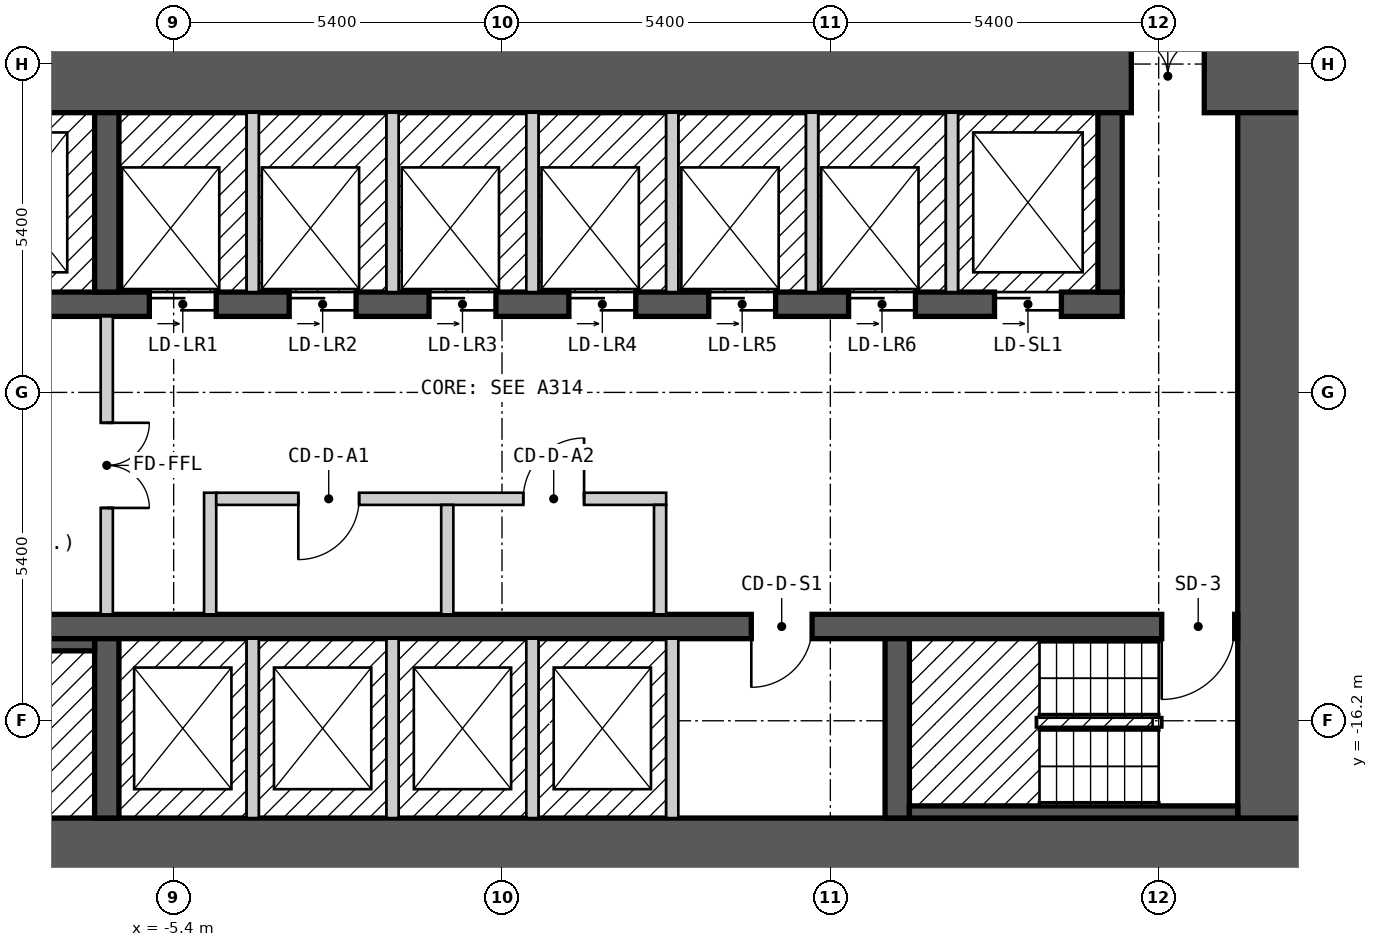
"""IFC4 building model, lengths in metres.
Left out: names, types, materials, properties, quantities, classifications, styles, units other than length and angle.
Written with IfcOpenShell. Run it as: python <this file> out.ifc"""

import sys

from ifc_helpers import new_model, si_unit, direction, frame, frame_2d, origin, place, context, subcontext, project, spatial, rectangle, extrude, element, fill, save


model = new_model("IFC4")
c1 = context("Model", 3, precision=1e-05, world=origin(), true_north=direction((0.0, 1.0)))
c2 = subcontext(c1, "Body", "Model", "MODEL_VIEW")
j1 = project(units=[si_unit("LENGTHUNIT", "METRE"), si_unit("PLANEANGLEUNIT", "RADIAN")], contexts=[c1])
p1 = place(None, origin())
s1 = spatial("IfcSite", under=j1, at=p1, CompositionType="ELEMENT")
p2 = place(p1, origin())
s2 = spatial("IfcBuilding", under=s1, at=p2, CompositionType="ELEMENT")
p3 = place(p2, frame((0.0, 0.0, 41.4)))
s3 = spatial("IfcBuildingStorey", under=s2, at=p3, CompositionType="ELEMENT", Elevation=41.4)
p4 = place(p3, frame((-13.3, -18.4, 0.0), z_axis=(0.0, 0.0, 1.0), x_axis=(1.0, 0.0, 0.0)))
e1 = element("IfcWall", 1, at=p4, inside=s3, PredefinedType="SHEAR", context=c2, shape_type="SweptSolid", body=[
    extrude(rectangle(XDim=26.6, YDim=1.2, at=frame_2d((13.3, 0.0))), origin(), (0.0, 0.0, 1.0), 2.7),
])
p5 = place(p3, frame((-13.3, -5.6, 0.0), z_axis=(0.0, 0.0, 1.0), x_axis=(1.0, 0.0, 0.0)))
e2 = element("IfcWall", 2, at=p5, inside=s3, PredefinedType="SHEAR", context=c2, shape_type="SweptSolid", body=[
    extrude(rectangle(XDim=26.6, YDim=1.2, at=frame_2d((13.3, 0.0))), origin(), (0.0, 0.0, 1.0), 2.7),
])
p6 = place(p5, frame((23.65, 0.0, 0.0)))
e3 = element("IfcOpeningElement", 3, at=p6, cuts=e2, PredefinedType="OPENING", context=c2, shape_type="SweptSolid", body=[
    extrude(rectangle(XDim=1.2, YDim=2.1, at=frame_2d((0.6, 1.05))), frame((0.0, 0.61, 0.0), z_axis=(0.0, -1.0, 0.0), x_axis=(1.0, 0.0, 0.0)), (0.0, 0.0, 1.0), 1.22),
])
p7 = place(p3, frame((12.7, -17.8, 0.0), z_axis=(0.0, 0.0, 1.0), x_axis=(0.0, 1.0, 0.0)))
e4 = element("IfcWall", 4, at=p7, inside=s3, PredefinedType="SHEAR", context=c2, shape_type="SweptSolid", body=[
    extrude(rectangle(XDim=11.6, YDim=1.2, at=frame_2d((5.8, 0.0))), origin(), (0.0, 0.0, 1.0), 2.7),
])
p8 = place(p3, frame((-12.1, -14.65, 0.0), z_axis=(0.0, 0.0, 1.0), x_axis=(1.0, 0.0, 0.0)))
e5 = element("IfcWall", 5, at=p8, inside=s3, PredefinedType="SHEAR", context=c2, shape_type="SweptSolid", body=[
    extrude(rectangle(XDim=24.2, YDim=0.4, at=frame_2d((12.1, 0.0))), origin(), (0.0, 0.0, 1.0), 2.7),
])
p9 = place(p8, frame((1.3, 0.0, 0.0), z_axis=(0.0, 0.0, 1.0), x_axis=(-1.0, 0.0, 0.0)))
e6 = element("IfcOpeningElement", 6, at=p9, cuts=e5, PredefinedType="OPENING", context=c2, shape_type="SweptSolid", body=[
    extrude(rectangle(XDim=1.2, YDim=2.1, at=frame_2d((0.6, 1.05))), frame((0.0, 0.21, 0.0), z_axis=(0.0, -1.0, 0.0), x_axis=(1.0, 0.0, 0.0)), (0.0, 0.0, 1.0), 0.42),
])
p10 = place(p8, frame((24.15, 0.0, 0.0), z_axis=(0.0, 0.0, 1.0), x_axis=(-1.0, 0.0, 0.0)))
e7 = element("IfcOpeningElement", 7, at=p10, cuts=e5, PredefinedType="OPENING", context=c2, shape_type="SweptSolid", body=[
    extrude(rectangle(XDim=1.2, YDim=2.1, at=frame_2d((0.6, 1.05))), frame((0.0, 0.21, 0.0), z_axis=(0.0, -1.0, 0.0), x_axis=(1.0, 0.0, 0.0)), (0.0, 0.0, 1.0), 0.42),
])
p11 = place(p8, frame((17.2, 0.0, 0.0), z_axis=(0.0, 0.0, 1.0), x_axis=(-1.0, 0.0, 0.0)))
e8 = element("IfcOpeningElement", 8, at=p11, cuts=e5, PredefinedType="OPENING", context=c2, shape_type="SweptSolid", body=[
    extrude(rectangle(XDim=1.0, YDim=2.1, at=frame_2d((0.5, 1.05))), frame((0.0, 0.21, 0.0), z_axis=(0.0, -1.0, 0.0), x_axis=(1.0, 0.0, 0.0)), (0.0, 0.0, 1.0), 0.42),
])
p12 = place(p3, frame((-12.1, -9.35, 0.0), z_axis=(0.0, 0.0, 1.0), x_axis=(1.0, 0.0, 0.0)))
e9 = element("IfcWall", 9, at=p12, inside=s3, PredefinedType="SHEAR", context=c2, shape_type="SweptSolid", body=[
    extrude(rectangle(XDim=22.3, YDim=0.4, at=frame_2d((11.15, 0.0))), origin(), (0.0, 0.0, 1.0), 2.7),
])
p13 = place(p12, frame((0.7, 0.0, 0.0)))
e10 = element("IfcOpeningElement", 10, at=p13, cuts=e9, PredefinedType="OPENING", context=c2, shape_type="SweptSolid", body=[
    extrude(rectangle(XDim=1.1, YDim=2.1, at=frame_2d((0.55, 1.05))), frame((0.0, 0.21, 0.0), z_axis=(0.0, -1.0, 0.0), x_axis=(1.0, 0.0, 0.0)), (0.0, 0.0, 1.0), 0.42),
])
p14 = place(p12, frame((3.5, 0.0, 0.0)))
e11 = element("IfcOpeningElement", 11, at=p14, cuts=e9, PredefinedType="OPENING", context=c2, shape_type="SweptSolid", body=[
    extrude(rectangle(XDim=1.1, YDim=2.1, at=frame_2d((0.55, 1.05))), frame((0.0, 0.21, 0.0), z_axis=(0.0, -1.0, 0.0), x_axis=(1.0, 0.0, 0.0)), (0.0, 0.0, 1.0), 0.42),
])
p15 = place(p12, frame((6.3, 0.0, 0.0)))
e12 = element("IfcOpeningElement", 12, at=p15, cuts=e9, PredefinedType="OPENING", context=c2, shape_type="SweptSolid", body=[
    extrude(rectangle(XDim=1.1, YDim=2.1, at=frame_2d((0.55, 1.05))), frame((0.0, 0.21, 0.0), z_axis=(0.0, -1.0, 0.0), x_axis=(1.0, 0.0, 0.0)), (0.0, 0.0, 1.0), 0.42),
])
p16 = place(p12, frame((8.6, 0.0, 0.0)))
e13 = element("IfcOpeningElement", 13, at=p16, cuts=e9, PredefinedType="OPENING", context=c2, shape_type="SweptSolid", body=[
    extrude(rectangle(XDim=1.1, YDim=2.1, at=frame_2d((0.55, 1.05))), frame((0.0, 0.21, 0.0), z_axis=(0.0, -1.0, 0.0), x_axis=(1.0, 0.0, 0.0)), (0.0, 0.0, 1.0), 0.42),
])
p17 = place(p12, frame((10.9, 0.0, 0.0)))
e14 = element("IfcOpeningElement", 14, at=p17, cuts=e9, PredefinedType="OPENING", context=c2, shape_type="SweptSolid", body=[
    extrude(rectangle(XDim=1.1, YDim=2.1, at=frame_2d((0.55, 1.05))), frame((0.0, 0.21, 0.0), z_axis=(0.0, -1.0, 0.0), x_axis=(1.0, 0.0, 0.0)), (0.0, 0.0, 1.0), 0.42),
])
p18 = place(p12, frame((13.2, 0.0, 0.0)))
e15 = element("IfcOpeningElement", 15, at=p18, cuts=e9, PredefinedType="OPENING", context=c2, shape_type="SweptSolid", body=[
    extrude(rectangle(XDim=1.1, YDim=2.1, at=frame_2d((0.55, 1.05))), frame((0.0, 0.21, 0.0), z_axis=(0.0, -1.0, 0.0), x_axis=(1.0, 0.0, 0.0)), (0.0, 0.0, 1.0), 0.42),
])
p19 = place(p12, frame((15.5, 0.0, 0.0)))
e16 = element("IfcOpeningElement", 16, at=p19, cuts=e9, PredefinedType="OPENING", context=c2, shape_type="SweptSolid", body=[
    extrude(rectangle(XDim=1.1, YDim=2.1, at=frame_2d((0.55, 1.05))), frame((0.0, 0.21, 0.0), z_axis=(0.0, -1.0, 0.0), x_axis=(1.0, 0.0, 0.0)), (0.0, 0.0, 1.0), 0.42),
])
p20 = place(p12, frame((17.8, 0.0, 0.0)))
e17 = element("IfcOpeningElement", 17, at=p20, cuts=e9, PredefinedType="OPENING", context=c2, shape_type="SweptSolid", body=[
    extrude(rectangle(XDim=1.1, YDim=2.1, at=frame_2d((0.55, 1.05))), frame((0.0, 0.21, 0.0), z_axis=(0.0, -1.0, 0.0), x_axis=(1.0, 0.0, 0.0)), (0.0, 0.0, 1.0), 0.42),
])
p21 = place(p12, frame((20.2, 0.0, 0.0)))
e18 = element("IfcOpeningElement", 18, at=p21, cuts=e9, PredefinedType="OPENING", context=c2, shape_type="SweptSolid", body=[
    extrude(rectangle(XDim=1.1, YDim=2.1, at=frame_2d((0.55, 1.05))), frame((0.0, 0.21, 0.0), z_axis=(0.0, -1.0, 0.0), x_axis=(1.0, 0.0, 0.0)), (0.0, 0.0, 1.0), 0.42),
])
for number, where, z_axis, x_axis in (
    (19, (-6.5, -17.8, 0.0), (0.0, 0.0, 1.0), (0.0, 1.0, 0.0)),
    (20, (6.5, -17.8, 0.0), (0.0, 0.0, 1.0), (0.0, 1.0, 0.0)),
    (21, (-6.5, -9.15, 0.0), (0.0, 0.0, 1.0), (0.0, 1.0, 0.0)),
    (22, (10.0, -9.15, 0.0), (0.0, 0.0, 1.0), (0.0, 1.0, 0.0)),
):
    element("IfcWall", number, at=place(p3, frame(where, z_axis=z_axis, x_axis=x_axis)), inside=s3, PredefinedType="SHEAR", context=c2, shape_type="SweptSolid", body=[
        extrude(rectangle(XDim=2.95, YDim=0.4, at=frame_2d((1.475, 0.0))), origin(), (0.0, 0.0, 1.0), 2.7),
    ])
p22 = place(p3, frame((-10.8, -14.95, 0.0), z_axis=(0.0, 0.0, 1.0), x_axis=(1.0, 0.0, 0.0)))
e23 = element("IfcWall", 23, at=p22, inside=s3, PredefinedType="SOLIDWALL", context=c2, shape_type="SweptSolid", body=[
    extrude(rectangle(XDim=4.1, YDim=0.2, at=frame_2d((2.05, 0.0))), origin(), (0.0, 0.0, 1.0), 2.7),
])
p23 = place(p3, frame((-6.5, -14.45, 0.0), z_axis=(0.0, 0.0, 1.0), x_axis=(0.0, 1.0, 0.0)))
e24 = element("IfcWall", 24, at=p23, inside=s3, PredefinedType="PARTITIONING", context=c2, shape_type="SweptSolid", body=[
    extrude(rectangle(XDim=4.9, YDim=0.2, at=frame_2d((2.45, 0.0))), origin(), (0.0, 0.0, 1.0), 2.7),
])
p24 = place(p23, frame((3.15, 0.0, 0.0), z_axis=(0.0, 0.0, 1.0), x_axis=(-1.0, 0.0, 0.0)))
e25 = element("IfcOpeningElement", 25, at=p24, cuts=e24, PredefinedType="OPENING", context=c2, shape_type="SweptSolid", body=[
    extrude(rectangle(XDim=1.4, YDim=2.1, at=frame_2d((0.7, 1.05))), frame((0.0, 0.11, 0.0), z_axis=(0.0, -1.0, 0.0), x_axis=(1.0, 0.0, 0.0)), (0.0, 0.0, 1.0), 0.22),
])
p25 = place(p3, frame((-4.8, -14.45, 0.0), z_axis=(0.0, 0.0, 1.0), x_axis=(0.0, 1.0, 0.0)))
e26 = element("IfcWall", 26, at=p25, inside=s3, PredefinedType="PARTITIONING", context=c2, shape_type="SweptSolid", body=[
    extrude(rectangle(XDim=2.0, YDim=0.2, at=frame_2d((1.0, 0.0))), origin(), (0.0, 0.0, 1.0), 2.7),
])
p26 = place(p3, frame((-4.7, -12.55, 0.0), z_axis=(0.0, 0.0, 1.0), x_axis=(1.0, 0.0, 0.0)))
e27 = element("IfcWall", 27, at=p26, inside=s3, PredefinedType="PARTITIONING", context=c2, shape_type="SweptSolid", body=[
    extrude(rectangle(XDim=7.4, YDim=0.2, at=frame_2d((3.7, 0.0))), origin(), (0.0, 0.0, 1.0), 2.7),
])
p27 = place(p26, frame((2.35, 0.0, 0.0), z_axis=(0.0, 0.0, 1.0), x_axis=(-1.0, 0.0, 0.0)))
e28 = element("IfcOpeningElement", 28, at=p27, cuts=e27, PredefinedType="OPENING", context=c2, shape_type="SweptSolid", body=[
    extrude(rectangle(XDim=1.0, YDim=2.1, at=frame_2d((0.5, 1.05))), frame((0.0, 0.11, 0.0), z_axis=(0.0, -1.0, 0.0), x_axis=(1.0, 0.0, 0.0)), (0.0, 0.0, 1.0), 0.22),
])
p28 = place(p26, frame((6.05, 0.0, 0.0), z_axis=(0.0, 0.0, 1.0), x_axis=(-1.0, 0.0, 0.0)))
e29 = element("IfcOpeningElement", 29, at=p28, cuts=e27, PredefinedType="OPENING", context=c2, shape_type="SweptSolid", body=[
    extrude(rectangle(XDim=1.0, YDim=2.1, at=frame_2d((0.5, 1.05))), frame((0.0, 0.11, 0.0), z_axis=(0.0, -1.0, 0.0), x_axis=(1.0, 0.0, 0.0)), (0.0, 0.0, 1.0), 0.22),
])
for number, where, z_axis, x_axis in (
    (30, (-4.1, -17.8, 0.0), (0.0, 0.0, 1.0), (0.0, 1.0, 0.0)),
    (31, (-4.1, -9.15, 0.0), (0.0, 0.0, 1.0), (0.0, 1.0, 0.0)),
    (32, (-1.8, -17.8, 0.0), (0.0, 0.0, 1.0), (0.0, 1.0, 0.0)),
    (33, (-1.8, -9.15, 0.0), (0.0, 0.0, 1.0), (0.0, 1.0, 0.0)),
):
    element("IfcWall", number, at=place(p3, frame(where, z_axis=z_axis, x_axis=x_axis)), inside=s3, PredefinedType="SOLIDWALL", context=c2, shape_type="SweptSolid", body=[
        extrude(rectangle(XDim=2.95, YDim=0.2, at=frame_2d((1.475, 0.0))), origin(), (0.0, 0.0, 1.0), 2.7),
    ])
p29 = place(p3, frame((-0.9, -14.45, 0.0), z_axis=(0.0, 0.0, 1.0), x_axis=(0.0, 1.0, 0.0)))
e34 = element("IfcWall", 34, at=p29, inside=s3, PredefinedType="PARTITIONING", context=c2, shape_type="SweptSolid", body=[
    extrude(rectangle(XDim=1.8, YDim=0.2, at=frame_2d((0.9, 0.0))), origin(), (0.0, 0.0, 1.0), 2.7),
])
for number, where, z_axis, x_axis in (
    (35, (0.5, -17.8, 0.0), (0.0, 0.0, 1.0), (0.0, 1.0, 0.0)),
    (36, (0.5, -9.15, 0.0), (0.0, 0.0, 1.0), (0.0, 1.0, 0.0)),
):
    element("IfcWall", number, at=place(p3, frame(where, z_axis=z_axis, x_axis=x_axis)), inside=s3, PredefinedType="SOLIDWALL", context=c2, shape_type="SweptSolid", body=[
        extrude(rectangle(XDim=2.95, YDim=0.2, at=frame_2d((1.475, 0.0))), origin(), (0.0, 0.0, 1.0), 2.7),
    ])
p30 = place(p3, frame((2.6, -14.45, 0.0), z_axis=(0.0, 0.0, 1.0), x_axis=(0.0, 1.0, 0.0)))
e37 = element("IfcWall", 37, at=p30, inside=s3, PredefinedType="PARTITIONING", context=c2, shape_type="SweptSolid", body=[
    extrude(rectangle(XDim=1.8, YDim=0.2, at=frame_2d((0.9, 0.0))), origin(), (0.0, 0.0, 1.0), 2.7),
])
for number, where, z_axis, x_axis in (
    (38, (2.8, -17.8, 0.0), (0.0, 0.0, 1.0), (0.0, 1.0, 0.0)),
    (39, (2.8, -9.15, 0.0), (0.0, 0.0, 1.0), (0.0, 1.0, 0.0)),
    (40, (5.1, -9.15, 0.0), (0.0, 0.0, 1.0), (0.0, 1.0, 0.0)),
):
    element("IfcWall", number, at=place(p3, frame(where, z_axis=z_axis, x_axis=x_axis)), inside=s3, PredefinedType="SOLIDWALL", context=c2, shape_type="SweptSolid", body=[
        extrude(rectangle(XDim=2.95, YDim=0.2, at=frame_2d((1.475, 0.0))), origin(), (0.0, 0.0, 1.0), 2.7),
    ])
p31 = place(p3, frame((6.7, -17.7, 0.0), z_axis=(0.0, 0.0, 1.0), x_axis=(1.0, 0.0, 0.0)))
e41 = element("IfcWall", 41, at=p31, inside=s3, PredefinedType="SOLIDWALL", context=c2, shape_type="SweptSolid", body=[
    extrude(rectangle(XDim=5.4, YDim=0.2, at=frame_2d((2.7, 0.0))), origin(), (0.0, 0.0, 1.0), 2.7),
])
p32 = place(p3, frame((7.4, -9.15, 0.0), z_axis=(0.0, 0.0, 1.0), x_axis=(0.0, 1.0, 0.0)))
e42 = element("IfcWall", 42, at=p32, inside=s3, PredefinedType="SOLIDWALL", context=c2, shape_type="SweptSolid", body=[
    extrude(rectangle(XDim=2.95, YDim=0.2, at=frame_2d((1.475, 0.0))), origin(), (0.0, 0.0, 1.0), 2.7),
])
p33 = place(p15, origin())
e43 = element("IfcDoor", 43, at=p33, inside=s3, OperationType="DOUBLE_DOOR_SLIDING", PredefinedType="DOOR", context=c2, shape_type="SweptSolid", body=[
    extrude(rectangle(XDim=1.1, YDim=2.1, at=frame_2d((0.55, 1.05))), frame((0.0, 0.025, 0.0), z_axis=(0.0, -1.0, 0.0), x_axis=(1.0, 0.0, 0.0)), (0.0, 0.0, 1.0), 0.05),
])
fill(e12, e43)
p34 = place(p16, origin())
e44 = element("IfcDoor", 44, at=p34, inside=s3, OperationType="DOUBLE_DOOR_SLIDING", PredefinedType="DOOR", context=c2, shape_type="SweptSolid", body=[
    extrude(rectangle(XDim=1.1, YDim=2.1, at=frame_2d((0.55, 1.05))), frame((0.0, 0.025, 0.0), z_axis=(0.0, -1.0, 0.0), x_axis=(1.0, 0.0, 0.0)), (0.0, 0.0, 1.0), 0.05),
])
fill(e13, e44)
p35 = place(p17, origin())
e45 = element("IfcDoor", 45, at=p35, inside=s3, OperationType="DOUBLE_DOOR_SLIDING", PredefinedType="DOOR", context=c2, shape_type="SweptSolid", body=[
    extrude(rectangle(XDim=1.1, YDim=2.1, at=frame_2d((0.55, 1.05))), frame((0.0, 0.025, 0.0), z_axis=(0.0, -1.0, 0.0), x_axis=(1.0, 0.0, 0.0)), (0.0, 0.0, 1.0), 0.05),
])
fill(e14, e45)
p36 = place(p18, origin())
e46 = element("IfcDoor", 46, at=p36, inside=s3, OperationType="DOUBLE_DOOR_SLIDING", PredefinedType="DOOR", context=c2, shape_type="SweptSolid", body=[
    extrude(rectangle(XDim=1.1, YDim=2.1, at=frame_2d((0.55, 1.05))), frame((0.0, 0.025, 0.0), z_axis=(0.0, -1.0, 0.0), x_axis=(1.0, 0.0, 0.0)), (0.0, 0.0, 1.0), 0.05),
])
fill(e15, e46)
p37 = place(p19, origin())
e47 = element("IfcDoor", 47, at=p37, inside=s3, OperationType="DOUBLE_DOOR_SLIDING", PredefinedType="DOOR", context=c2, shape_type="SweptSolid", body=[
    extrude(rectangle(XDim=1.1, YDim=2.1, at=frame_2d((0.55, 1.05))), frame((0.0, 0.025, 0.0), z_axis=(0.0, -1.0, 0.0), x_axis=(1.0, 0.0, 0.0)), (0.0, 0.0, 1.0), 0.05),
])
fill(e16, e47)
p38 = place(p20, origin())
e48 = element("IfcDoor", 48, at=p38, inside=s3, OperationType="DOUBLE_DOOR_SLIDING", PredefinedType="DOOR", context=c2, shape_type="SweptSolid", body=[
    extrude(rectangle(XDim=1.1, YDim=2.1, at=frame_2d((0.55, 1.05))), frame((0.0, 0.025, 0.0), z_axis=(0.0, -1.0, 0.0), x_axis=(1.0, 0.0, 0.0)), (0.0, 0.0, 1.0), 0.05),
])
fill(e17, e48)
p39 = place(p21, origin())
e49 = element("IfcDoor", 49, at=p39, inside=s3, OperationType="DOUBLE_DOOR_SLIDING", PredefinedType="DOOR", context=c2, shape_type="SweptSolid", body=[
    extrude(rectangle(XDim=1.1, YDim=2.1, at=frame_2d((0.55, 1.05))), frame((0.0, 0.025, 0.0), z_axis=(0.0, -1.0, 0.0), x_axis=(1.0, 0.0, 0.0)), (0.0, 0.0, 1.0), 0.05),
])
fill(e18, e49)
p40 = place(p10, origin())
e50 = element("IfcDoor", 50, at=p40, inside=s3, OperationType="SINGLE_SWING_RIGHT", PredefinedType="DOOR", context=c2, shape_type="SweptSolid", body=[
    extrude(rectangle(XDim=1.2, YDim=2.1, at=frame_2d((0.6, 1.05))), frame((0.0, 0.025, 0.0), z_axis=(0.0, -1.0, 0.0), x_axis=(1.0, 0.0, 0.0)), (0.0, 0.0, 1.0), 0.05),
])
fill(e7, e50)
p41 = place(p24, origin())
e51 = element("IfcDoor", 51, at=p41, inside=s3, OperationType="DOUBLE_DOOR_SINGLE_SWING", PredefinedType="DOOR", context=c2, shape_type="SweptSolid", body=[
    extrude(rectangle(XDim=1.4, YDim=2.1, at=frame_2d((0.7, 1.05))), frame((0.0, 0.025, 0.0), z_axis=(0.0, -1.0, 0.0), x_axis=(1.0, 0.0, 0.0)), (0.0, 0.0, 1.0), 0.05),
])
fill(e25, e51)
p42 = place(p6, origin())
e52 = element("IfcDoor", 52, at=p42, inside=s3, OperationType="DOUBLE_DOOR_SINGLE_SWING", PredefinedType="DOOR", context=c2, shape_type="SweptSolid", body=[
    extrude(rectangle(XDim=1.2, YDim=2.1, at=frame_2d((0.6, 1.05))), frame((0.0, 0.025, 0.0), z_axis=(0.0, -1.0, 0.0), x_axis=(1.0, 0.0, 0.0)), (0.0, 0.0, 1.0), 0.05),
])
fill(e3, e52)
p43 = place(p27, origin())
e53 = element("IfcDoor", 53, at=p43, inside=s3, OperationType="SINGLE_SWING_RIGHT", PredefinedType="DOOR", context=c2, shape_type="SweptSolid", body=[
    extrude(rectangle(XDim=1.0, YDim=2.1, at=frame_2d((0.5, 1.05))), frame((0.0, 0.025, 0.0), z_axis=(0.0, -1.0, 0.0), x_axis=(1.0, 0.0, 0.0)), (0.0, 0.0, 1.0), 0.05),
])
fill(e28, e53)
p44 = place(p28, origin())
e54 = element("IfcDoor", 54, at=p44, inside=s3, OperationType="SINGLE_SWING_LEFT", PredefinedType="DOOR", context=c2, shape_type="SweptSolid", body=[
    extrude(rectangle(XDim=1.0, YDim=2.1, at=frame_2d((0.5, 1.05))), frame((0.0, 0.025, 0.0), z_axis=(0.0, -1.0, 0.0), x_axis=(1.0, 0.0, 0.0)), (0.0, 0.0, 1.0), 0.05),
])
fill(e29, e54)
p45 = place(p11, origin())
e55 = element("IfcDoor", 55, at=p45, inside=s3, OperationType="SINGLE_SWING_RIGHT", PredefinedType="DOOR", context=c2, shape_type="SweptSolid", body=[
    extrude(rectangle(XDim=1.0, YDim=2.1, at=frame_2d((0.5, 1.05))), frame((0.0, 0.025, 0.0), z_axis=(0.0, -1.0, 0.0), x_axis=(1.0, 0.0, 0.0)), (0.0, 0.0, 1.0), 0.05),
])
fill(e8, e55)
save(model, sys.argv[1])
